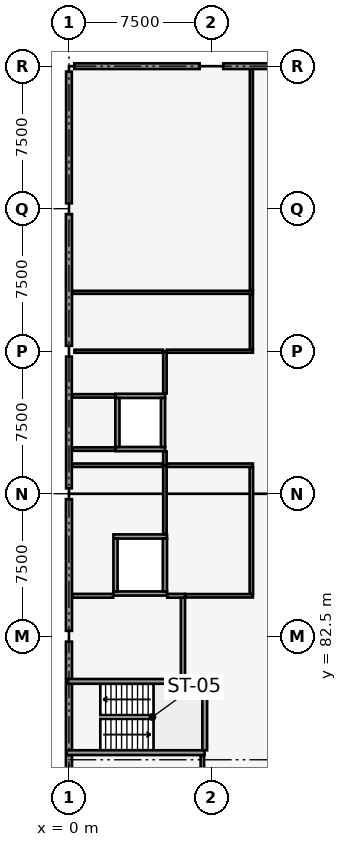
"""IFC4 building model, lengths in metres.
Left out: names, types, materials, properties, quantities, classifications, styles, units other than length and angle.
Written with IfcOpenShell. Run it as: python <this file> out.ifc"""

import sys

from ifc_helpers import new_model, si_unit, direction, frame, frame_2d, origin, origin_2d, place, context, subcontext, project, spatial, rectangle, extrude, element, fill, save


model = new_model("IFC4")
c1 = context("Model", 3, precision=1e-05, world=origin(), true_north=direction((0.0, 1.0)))
c2 = subcontext(c1, "Body", "Model", "MODEL_VIEW")
j1 = project(units=[si_unit("LENGTHUNIT", "METRE"), si_unit("PLANEANGLEUNIT", "RADIAN")], contexts=[c1])
p1 = place(None, origin())
s1 = spatial("IfcSite", under=j1, at=p1, CompositionType="ELEMENT")
p2 = place(p1, origin())
s2 = spatial("IfcBuilding", under=s1, at=p2, CompositionType="ELEMENT")
p3 = place(p2, frame((0.0, 0.0, 13.2)))
s3 = spatial("IfcBuildingStorey", under=s2, at=p3, CompositionType="ELEMENT", Elevation=13.2)
for number, where, z_axis, x_axis in (
    (1, (0.0, 82.5, 0.0), (0.0, 0.0, 1.0), (1.0, 0.0, 0.0)),
    (2, (0.0, 90.0, 0.0), (0.0, 0.0, 1.0), (1.0, 0.0, 0.0)),
    (3, (0.0, 97.5, 0.0), (0.0, 0.0, 1.0), (1.0, 0.0, 0.0)),
    (4, (0.0, 105.0, 0.0), (0.0, 0.0, 1.0), (1.0, 0.0, 0.0)),
    (5, (0.0, 112.5, 0.0), (0.0, 0.0, 1.0), (1.0, 0.0, 0.0)),
):
    element("IfcColumn", number, at=place(p3, frame(where, z_axis=z_axis, x_axis=x_axis)), inside=s3, PredefinedType="COLUMN", context=c2, shape_type="SweptSolid", body=[
        extrude(rectangle(XDim=0.55, YDim=0.55, at=origin_2d()), origin(), (0.0, 0.0, 1.0), 3.9),
    ])
p4 = place(p3, frame((0.285, 112.5, 0.0), z_axis=(0.0, 0.0, 1.0), x_axis=(1.0, 0.0, 0.0)))
e6 = element("IfcWall", 6, at=p4, inside=s3, PredefinedType="SOLIDWALL", context=c2, shape_type="SweptSolid", body=[
    extrude(rectangle(XDim=6.595, YDim=0.3, at=frame_2d((3.297, 0.0))), origin(), (0.0, 0.0, 1.0), 2.59),
])
p5 = place(p4, frame((2.465, 0.0, 0.6)))
e7 = element("IfcOpeningElement", 7, at=p5, cuts=e6, PredefinedType="OPENING", context=c2, shape_type="SweptSolid", body=[
    extrude(rectangle(XDim=2.0, YDim=1.45, at=frame_2d((1.0, 0.725))), frame((0.0, 0.16, 0.0), z_axis=(0.0, -1.0, 0.0), x_axis=(1.0, 0.0, 0.0)), (0.0, 0.0, 1.0), 0.32),
])
p6 = place(p3, frame((8.12, 112.5, 0.0), z_axis=(0.0, 0.0, 1.0), x_axis=(1.0, 0.0, 0.0)))
e8 = element("IfcWall", 8, at=p6, inside=s3, PredefinedType="SOLIDWALL", context=c2, shape_type="SweptSolid", body=[
    extrude(rectangle(XDim=6.595, YDim=0.3, at=frame_2d((3.297, 0.0))), origin(), (0.0, 0.0, 1.0), 2.59),
])
p7 = place(p6, frame((2.055, 0.0, 0.6)))
e9 = element("IfcOpeningElement", 9, at=p7, cuts=e8, PredefinedType="OPENING", context=c2, shape_type="SweptSolid", body=[
    extrude(rectangle(XDim=2.15, YDim=1.45, at=frame_2d((1.075, 0.725))), frame((0.0, 0.16, 0.0), z_axis=(0.0, -1.0, 0.0), x_axis=(1.0, 0.0, 0.0)), (0.0, 0.0, 1.0), 0.32),
])
for number, where, z_axis, x_axis in (
    (10, (0.0, 75.285, 0.0), (0.0, 0.0, 1.0), (0.0, 1.0, 0.0)),
    (11, (0.0, 82.785, 0.0), (0.0, 0.0, 1.0), (0.0, 1.0, 0.0)),
):
    element("IfcWall", number, at=place(p3, frame(where, z_axis=z_axis, x_axis=x_axis)), inside=s3, PredefinedType="SOLIDWALL", context=c2, shape_type="SweptSolid", body=[
        extrude(rectangle(XDim=6.93, YDim=0.32, at=frame_2d((3.465, 0.0))), origin(), (0.0, 0.0, 1.0), 2.59),
    ])
p8 = place(p3, frame((0.0, 90.285, 0.0), z_axis=(0.0, 0.0, 1.0), x_axis=(0.0, 1.0, 0.0)))
e12 = element("IfcWall", 12, at=p8, inside=s3, PredefinedType="SOLIDWALL", context=c2, shape_type="SweptSolid", body=[
    extrude(rectangle(XDim=6.93, YDim=0.3, at=frame_2d((3.465, 0.0))), origin(), (0.0, 0.0, 1.0), 2.59),
])
p9 = place(p8, frame((2.665, 0.0, 0.6)))
e13 = element("IfcOpeningElement", 13, at=p9, cuts=e12, PredefinedType="OPENING", context=c2, shape_type="SweptSolid", body=[
    extrude(rectangle(XDim=1.6, YDim=1.3, at=frame_2d((0.8, 0.65))), frame((0.0, 0.16, 0.0), z_axis=(0.0, -1.0, 0.0), x_axis=(1.0, 0.0, 0.0)), (0.0, 0.0, 1.0), 0.32),
])
p10 = place(p8, frame((5.163, 0.0, 0.6)))
e14 = element("IfcOpeningElement", 14, at=p10, cuts=e12, PredefinedType="OPENING", context=c2, shape_type="SweptSolid", body=[
    extrude(rectangle(XDim=1.5, YDim=1.2, at=frame_2d((0.75, 0.6))), frame((0.0, 0.16, 0.0), z_axis=(0.0, -1.0, 0.0), x_axis=(1.0, 0.0, 0.0)), (0.0, 0.0, 1.0), 0.32),
])
p11 = place(p3, frame((0.0, 97.785, 0.0), z_axis=(0.0, 0.0, 1.0), x_axis=(0.0, 1.0, 0.0)))
e15 = element("IfcWall", 15, at=p11, inside=s3, PredefinedType="SOLIDWALL", context=c2, shape_type="SweptSolid", body=[
    extrude(rectangle(XDim=6.93, YDim=0.32, at=frame_2d((3.465, 0.0))), origin(), (0.0, 0.0, 1.0), 2.59),
])
p12 = place(p3, frame((0.0, 105.285, 0.0), z_axis=(0.0, 0.0, 1.0), x_axis=(0.0, 1.0, 0.0)))
e16 = element("IfcWall", 16, at=p12, inside=s3, PredefinedType="SOLIDWALL", context=c2, shape_type="SweptSolid", body=[
    extrude(rectangle(XDim=6.93, YDim=0.3, at=frame_2d((3.465, 0.0))), origin(), (0.0, 0.0, 1.0), 2.59),
])
p13 = place(p3, frame((-0.12, 76.375, 0.0), z_axis=(0.0, 0.0, 1.0), x_axis=(1.0, 0.0, 0.0)))
e17 = element("IfcWall", 17, at=p13, inside=s3, PredefinedType="SOLIDWALL", context=c2, shape_type="SweptSolid", body=[
    extrude(rectangle(XDim=7.26, YDim=0.25, at=frame_2d((3.63, 0.0))), origin(), (0.0, 0.0, 1.0), 3.62),
])
p14 = place(p3, frame((-0.12, 80.125, 0.0), z_axis=(0.0, 0.0, 1.0), x_axis=(1.0, 0.0, 0.0)))
e18 = element("IfcWall", 18, at=p14, inside=s3, PredefinedType="SOLIDWALL", context=c2, shape_type="SweptSolid", body=[
    extrude(rectangle(XDim=7.26, YDim=0.25, at=frame_2d((3.63, 0.0))), origin(), (0.0, 0.0, 1.0), 3.62),
])
p15 = place(p14, frame((0.45, 0.0, 0.0)))
e19 = element("IfcOpeningElement", 19, at=p15, cuts=e18, PredefinedType="OPENING", context=c2, shape_type="SweptSolid", body=[
    extrude(rectangle(XDim=1.1, YDim=2.15, at=frame_2d((0.55, 1.075))), frame((0.0, 0.135, 0.0), z_axis=(0.0, -1.0, 0.0), x_axis=(1.0, 0.0, 0.0)), (0.0, 0.0, 1.0), 0.27),
])
p16 = place(p3, frame((7.145, 76.5, 0.0), z_axis=(0.0, 0.0, 1.0), x_axis=(0.0, 1.0, 0.0)))
e20 = element("IfcWall", 20, at=p16, inside=s3, PredefinedType="SOLIDWALL", context=c2, shape_type="SweptSolid", body=[
    extrude(rectangle(XDim=3.5, YDim=0.25, at=frame_2d((1.75, 0.0))), origin(), (0.0, 0.0, 1.0), 3.62),
])
for number, where, z_axis, x_axis in (
    (21, (2.44, 92.35, 0.0), (0.0, 0.0, 1.0), (1.0, 0.0, 0.0)),
    (22, (2.44, 95.15, 0.0), (0.0, 0.0, 1.0), (1.0, 0.0, 0.0)),
):
    element("IfcWall", number, at=place(p3, frame(where, z_axis=z_axis, x_axis=x_axis)), inside=s3, PredefinedType="SOLIDWALL", context=c2, shape_type="SweptSolid", body=[
        extrude(rectangle(XDim=2.62, YDim=0.22, at=frame_2d((1.31, 0.0))), origin(), (0.0, 0.0, 1.0), 3.62),
    ])
p17 = place(p3, frame((2.55, 92.46, 0.0), z_axis=(0.0, 0.0, 1.0), x_axis=(0.0, 1.0, 0.0)))
e23 = element("IfcWall", 23, at=p17, inside=s3, PredefinedType="SOLIDWALL", context=c2, shape_type="SweptSolid", body=[
    extrude(rectangle(XDim=2.58, YDim=0.22, at=frame_2d((1.29, 0.0))), origin(), (0.0, 0.0, 1.0), 3.62),
])
p18 = place(p3, frame((4.95, 92.46, 0.0), z_axis=(0.0, 0.0, 1.0), x_axis=(0.0, 1.0, 0.0)))
e24 = element("IfcWall", 24, at=p18, inside=s3, PredefinedType="SOLIDWALL", context=c2, shape_type="SweptSolid", body=[
    extrude(rectangle(XDim=2.58, YDim=0.22, at=frame_2d((1.29, 0.0))), origin(), (0.0, 0.0, 1.0), 3.62),
])
p19 = place(p18, frame((0.79, 0.0, 0.0)))
e25 = element("IfcOpeningElement", 25, at=p19, cuts=e24, PredefinedType="OPENING", context=c2, shape_type="SweptSolid", body=[
    extrude(rectangle(XDim=1.0, YDim=2.15, at=frame_2d((0.5, 1.075))), frame((0.0, 0.12, 0.0), z_axis=(0.0, -1.0, 0.0), x_axis=(1.0, 0.0, 0.0)), (0.0, 0.0, 1.0), 0.24),
])
p20 = place(p3, frame((2.34, 84.75, 0.0), z_axis=(0.0, 0.0, 1.0), x_axis=(1.0, 0.0, 0.0)))
e26 = element("IfcWall", 26, at=p20, inside=s3, PredefinedType="SOLIDWALL", context=c2, shape_type="SweptSolid", body=[
    extrude(rectangle(XDim=2.82, YDim=0.22, at=frame_2d((1.41, 0.0))), origin(), (0.0, 0.0, 1.0), 3.62),
])
p21 = place(p20, frame((0.86, 0.0, 0.0)))
e27 = element("IfcOpeningElement", 27, at=p21, cuts=e26, PredefinedType="OPENING", context=c2, shape_type="SweptSolid", body=[
    extrude(rectangle(XDim=1.1, YDim=2.15, at=frame_2d((0.55, 1.075))), frame((0.0, 0.12, 0.0), z_axis=(0.0, -1.0, 0.0), x_axis=(1.0, 0.0, 0.0)), (0.0, 0.0, 1.0), 0.24),
])
p22 = place(p3, frame((2.34, 87.75, 0.0), z_axis=(0.0, 0.0, 1.0), x_axis=(1.0, 0.0, 0.0)))
e28 = element("IfcWall", 28, at=p22, inside=s3, PredefinedType="SOLIDWALL", context=c2, shape_type="SweptSolid", body=[
    extrude(rectangle(XDim=2.82, YDim=0.22, at=frame_2d((1.41, 0.0))), origin(), (0.0, 0.0, 1.0), 3.62),
])
for number, where, z_axis, x_axis in (
    (29, (2.45, 84.86, 0.0), (0.0, 0.0, 1.0), (0.0, 1.0, 0.0)),
    (30, (5.05, 84.86, 0.0), (0.0, 0.0, 1.0), (0.0, 1.0, 0.0)),
):
    element("IfcWall", number, at=place(p3, frame(where, z_axis=z_axis, x_axis=x_axis)), inside=s3, PredefinedType="SOLIDWALL", context=c2, shape_type="SweptSolid", body=[
        extrude(rectangle(XDim=2.78, YDim=0.22, at=frame_2d((1.39, 0.0))), origin(), (0.0, 0.0, 1.0), 3.62),
    ])
p23 = place(p3, frame((6.0, 80.26, 0.0), z_axis=(0.0, 0.0, 1.0), x_axis=(0.0, 1.0, 0.0)))
e31 = element("IfcWall", 31, at=p23, inside=s3, PredefinedType="SOLIDWALL", context=c2, shape_type="SweptSolid", body=[
    extrude(rectangle(XDim=4.37, YDim=0.22, at=frame_2d((2.185, 0.0))), origin(), (0.0, 0.0, 1.0), 3.62),
])
p24 = place(p23, frame((0.45, 0.0, 0.0)))
e32 = element("IfcOpeningElement", 32, at=p24, cuts=e31, PredefinedType="OPENING", context=c2, shape_type="SweptSolid", body=[
    extrude(rectangle(XDim=1.1, YDim=2.15, at=frame_2d((0.55, 1.075))), frame((0.0, 0.12, 0.0), z_axis=(0.0, -1.0, 0.0), x_axis=(1.0, 0.0, 0.0)), (0.0, 0.0, 1.0), 0.24),
])
p25 = place(p3, frame((0.18, 84.63, 0.0), z_axis=(0.0, 0.0, 1.0), x_axis=(1.0, 0.0, 0.0)))
e33 = element("IfcWall", 33, at=p25, inside=s3, PredefinedType="PARTITIONING", context=c2, shape_type="SweptSolid", body=[
    extrude(rectangle(XDim=2.145, YDim=0.2, at=frame_2d((1.073, 0.0))), origin(), (0.0, 0.0, 1.0), 2.85),
])
p26 = place(p3, frame((5.175, 84.63, 0.0), z_axis=(0.0, 0.0, 1.0), x_axis=(1.0, 0.0, 0.0)))
e34 = element("IfcWall", 34, at=p26, inside=s3, PredefinedType="PARTITIONING", context=c2, shape_type="SweptSolid", body=[
    extrude(rectangle(XDim=0.935, YDim=0.2, at=frame_2d((0.468, 0.0))), origin(), (0.0, 0.0, 1.0), 3.05),
])
p27 = place(p3, frame((7.02, 75.0, 0.0), z_axis=(0.0, 0.0, 1.0), x_axis=(0.0, 1.0, 0.0)))
e35 = element("IfcWall", 35, at=p27, inside=s3, PredefinedType="PARTITIONING", context=c2, shape_type="SweptSolid", body=[
    extrude(rectangle(XDim=1.236, YDim=0.18, at=frame_2d((0.618, 0.0))), origin(), (0.0, 0.0, 1.0), 2.59),
])
p28 = place(p3, frame((5.05, 87.874, 0.0), z_axis=(0.0, 0.0, 1.0), x_axis=(0.0, 1.0, 0.0)))
e36 = element("IfcWall", 36, at=p28, inside=s3, PredefinedType="PARTITIONING", context=c2, shape_type="SweptSolid", body=[
    extrude(rectangle(XDim=3.626, YDim=0.18, at=frame_2d((1.813, 0.0))), origin(), (0.0, 0.0, 1.0), 2.59),
])
p29 = place(p3, frame((6.124, 84.63, 0.0), z_axis=(0.0, 0.0, 1.0), x_axis=(1.0, 0.0, 0.0)))
e37 = element("IfcWall", 37, at=p29, inside=s3, PredefinedType="PARTITIONING", context=c2, shape_type="SweptSolid", body=[
    extrude(rectangle(XDim=3.556, YDim=0.18, at=frame_2d((1.778, 0.0))), origin(), (0.0, 0.0, 1.0), 2.97),
])
p30 = place(p3, frame((0.164, 91.5, 0.0), z_axis=(0.0, 0.0, 1.0), x_axis=(1.0, 0.0, 0.0)))
e38 = element("IfcWall", 38, at=p30, inside=s3, PredefinedType="PARTITIONING", context=c2, shape_type="SweptSolid", body=[
    extrude(rectangle(XDim=4.782, YDim=0.18, at=frame_2d((2.391, 0.0))), origin(), (0.0, 0.0, 1.0), 2.84),
])
p31 = place(p3, frame((5.154, 91.5, 0.0), z_axis=(0.0, 0.0, 1.0), x_axis=(1.0, 0.0, 0.0)))
e39 = element("IfcWall", 39, at=p31, inside=s3, PredefinedType="PARTITIONING", context=c2, shape_type="SweptSolid", body=[
    extrude(rectangle(XDim=4.526, YDim=0.18, at=frame_2d((2.263, 0.0))), origin(), (0.0, 0.0, 1.0), 2.97),
])
p32 = place(p3, frame((9.6, 84.734, 0.0), z_axis=(0.0, 0.0, 1.0), x_axis=(0.0, 1.0, 0.0)))
e40 = element("IfcWall", 40, at=p32, inside=s3, PredefinedType="PARTITIONING", context=c2, shape_type="SweptSolid", body=[
    extrude(rectangle(XDim=6.662, YDim=0.18, at=frame_2d((3.331, 0.0))), origin(), (0.0, 0.0, 1.0), 2.59),
])
p33 = place(p32, frame((2.241, 0.0, 0.0)))
e41 = element("IfcOpeningElement", 41, at=p33, cuts=e40, PredefinedType="OPENING", context=c2, shape_type="SweptSolid", body=[
    extrude(rectangle(XDim=1.05, YDim=2.12, at=frame_2d((0.525, 1.06))), frame((0.0, 0.1, 0.0), z_axis=(0.0, -1.0, 0.0), x_axis=(1.0, 0.0, 0.0)), (0.0, 0.0, 1.0), 0.2),
])
for number, where, z_axis, x_axis in (
    (42, (0.164, 92.35, 0.0), (0.0, 0.0, 1.0), (1.0, 0.0, 0.0)),
    (43, (0.164, 95.15, 0.0), (0.0, 0.0, 1.0), (1.0, 0.0, 0.0)),
):
    element("IfcWall", number, at=place(p3, frame(where, z_axis=z_axis, x_axis=x_axis)), inside=s3, PredefinedType="PARTITIONING", context=c2, shape_type="SweptSolid", body=[
        extrude(rectangle(XDim=2.276, YDim=0.18, at=frame_2d((1.138, 0.0))), origin(), (0.0, 0.0, 1.0), 2.84),
    ])
p34 = place(p3, frame((5.05, 91.5, 0.0), z_axis=(0.0, 0.0, 1.0), x_axis=(0.0, 1.0, 0.0)))
e44 = element("IfcWall", 44, at=p34, inside=s3, PredefinedType="PARTITIONING", context=c2, shape_type="SweptSolid", body=[
    extrude(rectangle(XDim=0.726, YDim=0.18, at=frame_2d((0.363, 0.0))), origin(), (0.0, 0.0, 1.0), 2.97),
])
p35 = place(p3, frame((5.05, 95.274, 0.0), z_axis=(0.0, 0.0, 1.0), x_axis=(0.0, 1.0, 0.0)))
e45 = element("IfcWall", 45, at=p35, inside=s3, PredefinedType="PARTITIONING", context=c2, shape_type="SweptSolid", body=[
    extrude(rectangle(XDim=2.226, YDim=0.18, at=frame_2d((1.113, 0.0))), origin(), (0.0, 0.0, 1.0), 2.59),
])
p36 = place(p3, frame((0.289, 97.5, 0.0), z_axis=(0.0, 0.0, 1.0), x_axis=(1.0, 0.0, 0.0)))
e46 = element("IfcWall", 46, at=p36, inside=s3, PredefinedType="PARTITIONING", context=c2, shape_type="SweptSolid", body=[
    extrude(rectangle(XDim=4.657, YDim=0.16, at=frame_2d((2.329, 0.0))), origin(), (0.0, 0.0, 1.0), 2.59),
])
p37 = place(p3, frame((5.154, 97.5, 0.0), z_axis=(0.0, 0.0, 1.0), x_axis=(1.0, 0.0, 0.0)))
e47 = element("IfcWall", 47, at=p37, inside=s3, PredefinedType="PARTITIONING", context=c2, shape_type="SweptSolid", body=[
    extrude(rectangle(XDim=4.526, YDim=0.16, at=frame_2d((2.263, 0.0))), origin(), (0.0, 0.0, 1.0), 2.59),
])
p38 = place(p3, frame((0.174, 100.6, 0.0), z_axis=(0.0, 0.0, 1.0), x_axis=(1.0, 0.0, 0.0)))
e48 = element("IfcWall", 48, at=p38, inside=s3, PredefinedType="PARTITIONING", context=c2, shape_type="SweptSolid", body=[
    extrude(rectangle(XDim=9.506, YDim=0.16, at=frame_2d((4.753, 0.0))), origin(), (0.0, 0.0, 1.0), 2.97),
])
p39 = place(p3, frame((9.6, 97.594, 0.0), z_axis=(0.0, 0.0, 1.0), x_axis=(0.0, 1.0, 0.0)))
e49 = element("IfcWall", 49, at=p39, inside=s3, PredefinedType="PARTITIONING", context=c2, shape_type="SweptSolid", body=[
    extrude(rectangle(XDim=2.912, YDim=0.16, at=frame_2d((1.456, 0.0))), origin(), (0.0, 0.0, 1.0), 2.59),
])
p40 = place(p39, frame((0.981, 0.0, 0.0)))
e50 = element("IfcOpeningElement", 50, at=p40, cuts=e49, PredefinedType="OPENING", context=c2, shape_type="SweptSolid", body=[
    extrude(rectangle(XDim=0.95, YDim=2.1, at=frame_2d((0.475, 1.05))), frame((0.0, 0.09, 0.0), z_axis=(0.0, -1.0, 0.0), x_axis=(1.0, 0.0, 0.0)), (0.0, 0.0, 1.0), 0.18),
])
p41 = place(p3, frame((9.6, 100.694, 0.0), z_axis=(0.0, 0.0, 1.0), x_axis=(0.0, 1.0, 0.0)))
e51 = element("IfcWall", 51, at=p41, inside=s3, PredefinedType="PARTITIONING", context=c2, shape_type="SweptSolid", body=[
    extrude(rectangle(XDim=11.642, YDim=0.16, at=frame_2d((5.821, 0.0))), origin(), (0.0, 0.0, 1.0), 2.59),
])
p42 = place(p41, frame((5.281, 0.0, 0.0)))
e52 = element("IfcOpeningElement", 52, at=p42, cuts=e51, PredefinedType="OPENING", context=c2, shape_type="SweptSolid", body=[
    extrude(rectangle(XDim=1.05, YDim=2.12, at=frame_2d((0.525, 1.06))), frame((0.0, 0.09, 0.0), z_axis=(0.0, -1.0, 0.0), x_axis=(1.0, 0.0, 0.0)), (0.0, 0.0, 1.0), 0.18),
])
p43 = place(p5, origin())
e53 = element("IfcWindow", 53, at=p43, inside=s3, PartitioningType="SINGLE_PANEL", PredefinedType="WINDOW", context=c2, shape_type="SweptSolid", body=[
    extrude(rectangle(XDim=2.0, YDim=1.45, at=frame_2d((1.0, 0.725))), frame((0.0, 0.03, 0.0), z_axis=(0.0, -1.0, 0.0), x_axis=(1.0, 0.0, 0.0)), (0.0, 0.0, 1.0), 0.06),
])
fill(e7, e53)
p44 = place(p7, origin())
e54 = element("IfcWindow", 54, at=p44, inside=s3, PartitioningType="SINGLE_PANEL", PredefinedType="WINDOW", context=c2, shape_type="SweptSolid", body=[
    extrude(rectangle(XDim=2.15, YDim=1.45, at=frame_2d((1.075, 0.725))), frame((0.0, 0.03, 0.0), z_axis=(0.0, -1.0, 0.0), x_axis=(1.0, 0.0, 0.0)), (0.0, 0.0, 1.0), 0.06),
])
fill(e9, e54)
p45 = place(p9, origin())
e55 = element("IfcWindow", 55, at=p45, inside=s3, PartitioningType="SINGLE_PANEL", PredefinedType="WINDOW", context=c2, shape_type="SweptSolid", body=[
    extrude(rectangle(XDim=1.6, YDim=1.3, at=frame_2d((0.8, 0.65))), frame((0.0, 0.03, 0.0), z_axis=(0.0, -1.0, 0.0), x_axis=(1.0, 0.0, 0.0)), (0.0, 0.0, 1.0), 0.06),
])
fill(e13, e55)
p46 = place(p10, origin())
e56 = element("IfcWindow", 56, at=p46, inside=s3, PartitioningType="SINGLE_PANEL", PredefinedType="WINDOW", context=c2, shape_type="SweptSolid", body=[
    extrude(rectangle(XDim=1.5, YDim=1.2, at=frame_2d((0.75, 0.6))), frame((0.0, 0.03, 0.0), z_axis=(0.0, -1.0, 0.0), x_axis=(1.0, 0.0, 0.0)), (0.0, 0.0, 1.0), 0.06),
])
fill(e14, e56)
p47 = place(p15, origin())
e57 = element("IfcDoor", 57, at=p47, inside=s3, OperationType="SINGLE_SWING_LEFT", PredefinedType="DOOR", context=c2, shape_type="SweptSolid", body=[
    extrude(rectangle(XDim=1.1, YDim=2.15, at=frame_2d((0.55, 1.075))), frame((0.0, 0.025, 0.0), z_axis=(0.0, -1.0, 0.0), x_axis=(1.0, 0.0, 0.0)), (0.0, 0.0, 1.0), 0.05),
])
fill(e19, e57)
p48 = place(p19, origin())
e58 = element("IfcDoor", 58, at=p48, inside=s3, OperationType="SLIDING_TO_LEFT", PredefinedType="DOOR", context=c2, shape_type="SweptSolid", body=[
    extrude(rectangle(XDim=1.0, YDim=2.15, at=frame_2d((0.5, 1.075))), frame((0.0, 0.025, 0.0), z_axis=(0.0, -1.0, 0.0), x_axis=(1.0, 0.0, 0.0)), (0.0, 0.0, 1.0), 0.05),
])
fill(e25, e58)
p49 = place(p21, origin())
e59 = element("IfcDoor", 59, at=p49, inside=s3, OperationType="SLIDING_TO_LEFT", PredefinedType="DOOR", context=c2, shape_type="SweptSolid", body=[
    extrude(rectangle(XDim=1.1, YDim=2.15, at=frame_2d((0.55, 1.075))), frame((0.0, 0.025, 0.0), z_axis=(0.0, -1.0, 0.0), x_axis=(1.0, 0.0, 0.0)), (0.0, 0.0, 1.0), 0.05),
])
fill(e27, e59)
p50 = place(p24, origin())
e60 = element("IfcDoor", 60, at=p50, inside=s3, OperationType="SINGLE_SWING_RIGHT", PredefinedType="DOOR", context=c2, shape_type="SweptSolid", body=[
    extrude(rectangle(XDim=1.1, YDim=2.15, at=frame_2d((0.55, 1.075))), frame((0.0, 0.025, 0.0), z_axis=(0.0, -1.0, 0.0), x_axis=(1.0, 0.0, 0.0)), (0.0, 0.0, 1.0), 0.05),
])
fill(e32, e60)
p51 = place(p33, origin())
e61 = element("IfcDoor", 61, at=p51, inside=s3, OperationType="SINGLE_SWING_LEFT", PredefinedType="DOOR", context=c2, shape_type="SweptSolid", body=[
    extrude(rectangle(XDim=1.05, YDim=2.12, at=frame_2d((0.525, 1.06))), frame((0.0, 0.025, 0.0), z_axis=(0.0, -1.0, 0.0), x_axis=(1.0, 0.0, 0.0)), (0.0, 0.0, 1.0), 0.05),
])
fill(e41, e61)
p52 = place(p40, origin())
e62 = element("IfcDoor", 62, at=p52, inside=s3, OperationType="SINGLE_SWING_RIGHT", PredefinedType="DOOR", context=c2, shape_type="SweptSolid", body=[
    extrude(rectangle(XDim=0.95, YDim=2.1, at=frame_2d((0.475, 1.05))), frame((0.0, 0.025, 0.0), z_axis=(0.0, -1.0, 0.0), x_axis=(1.0, 0.0, 0.0)), (0.0, 0.0, 1.0), 0.05),
])
fill(e50, e62)
p53 = place(p42, origin())
e63 = element("IfcDoor", 63, at=p53, inside=s3, OperationType="SINGLE_SWING_LEFT", PredefinedType="DOOR", context=c2, shape_type="SweptSolid", body=[
    extrude(rectangle(XDim=1.05, YDim=2.12, at=frame_2d((0.525, 1.06))), frame((0.0, 0.025, 0.0), z_axis=(0.0, -1.0, 0.0), x_axis=(1.0, 0.0, 0.0)), (0.0, 0.0, 1.0), 0.05),
])
fill(e52, e63)
save(model, sys.argv[1])
